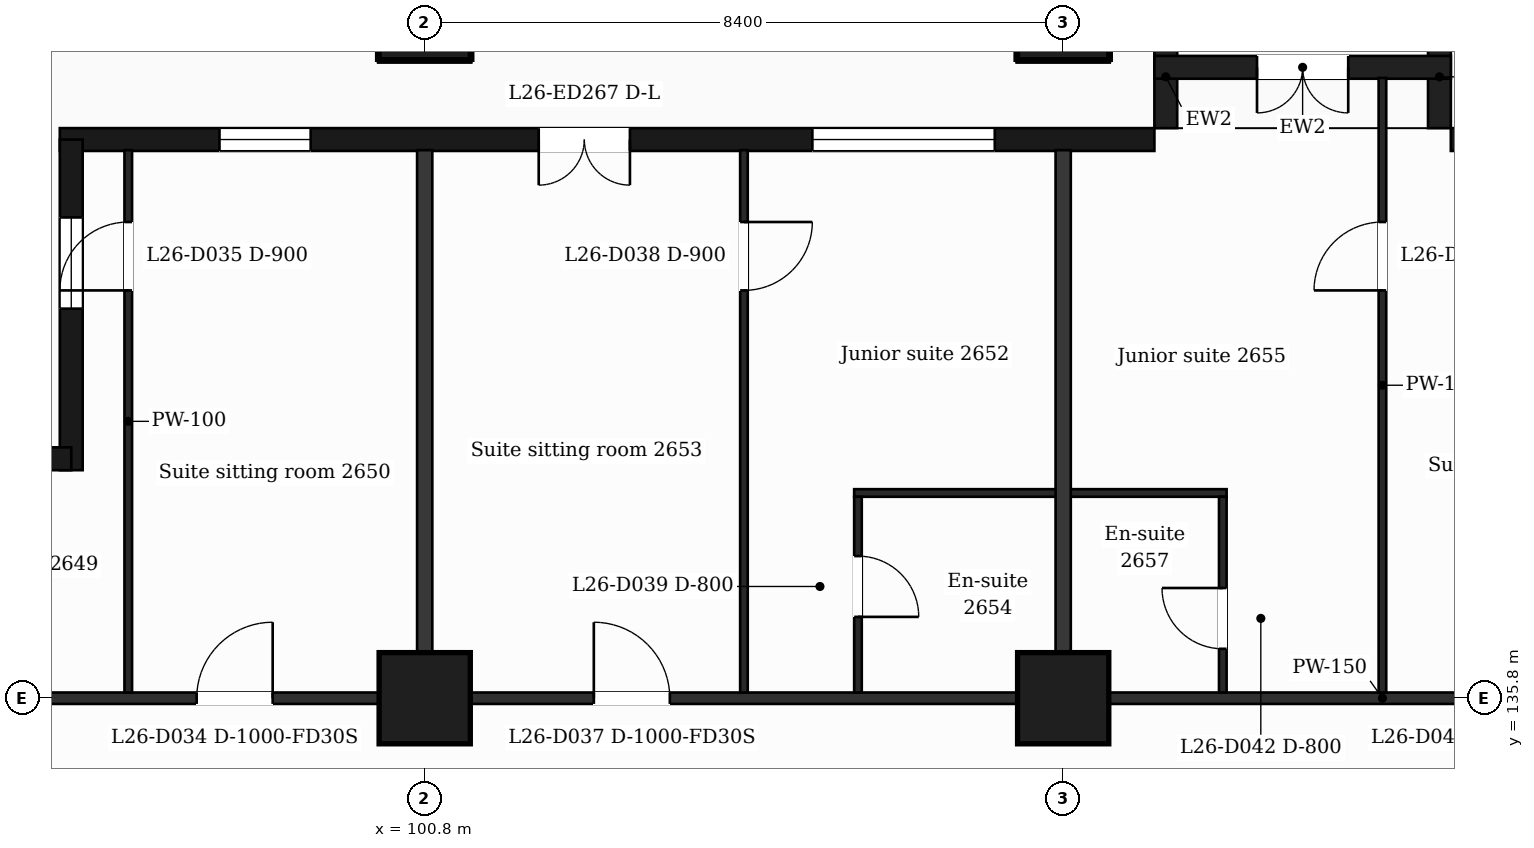
"""IFC4 building model, lengths in metres.
Left out: names, types, materials, properties, quantities, classifications, styles, units other than length and angle.
Written with IfcOpenShell. Run it as: python <this file> out.ifc"""

import sys

from ifc_helpers import new_model, si_unit, direction, frame, frame_2d, origin, origin_2d, place, context, subcontext, project, spatial, rectangle, extrude, element, fill, save


model = new_model("IFC4")
c1 = context("Model", 3, precision=1e-05, world=origin(), true_north=direction((0.0, 1.0)))
c2 = subcontext(c1, "Body", "Model", "MODEL_VIEW")
j1 = project(units=[si_unit("LENGTHUNIT", "METRE"), si_unit("PLANEANGLEUNIT", "RADIAN")], contexts=[c1])
p1 = place(None, origin())
s1 = spatial("IfcSite", under=j1, at=p1, CompositionType="ELEMENT")
p2 = place(p1, origin())
s2 = spatial("IfcBuilding", under=s1, at=p2, CompositionType="ELEMENT")
p3 = place(p2, frame((0.0, 0.0, 113.2)))
s3 = spatial("IfcBuildingStorey", under=s2, at=p3, CompositionType="ELEMENT", Elevation=113.2)
for number, where, z_axis, x_axis in (
    (1, (100.8, 135.8, 0.0), (0.0, 0.0, 1.0), (1.0, 0.0, 0.0)),
    (2, (109.2, 135.8, 0.0), (0.0, 0.0, 1.0), (1.0, 0.0, 0.0)),
    (3, (100.8, 144.8, 0.0), (0.0, 0.0, 1.0), (1.0, 0.0, 0.0)),
    (4, (109.2, 144.8, 0.0), (0.0, 0.0, 1.0), (1.0, 0.0, 0.0)),
):
    element("IfcColumn", number, at=place(p3, frame(where, z_axis=z_axis, x_axis=x_axis)), inside=s3, PredefinedType="COLUMN", context=c2, shape_type="SweptSolid", body=[
        extrude(rectangle(XDim=1.2, YDim=1.2, at=origin_2d()), origin(), (0.0, 0.0, 1.0), 3.7),
    ])
p4 = place(p3, frame((130.65, 143.15, 0.0), z_axis=(0.0, 0.0, 1.0), x_axis=(-1.0, 0.0, 0.0)))
e5 = element("IfcWall", 5, at=p4, inside=s3, PredefinedType="SOLIDWALL", context=c2, shape_type="SweptSolid", body=[
    extrude(rectangle(XDim=16.35, YDim=0.3, at=frame_2d((8.175, 0.0))), origin(), (0.0, 0.0, 1.0), 3.38),
])
p5 = place(p4, frame((1.95, 0.0, 0.9)))
e6 = element("IfcOpeningElement", 6, at=p5, cuts=e5, PredefinedType="OPENING", context=c2, shape_type="SweptSolid", body=[
    extrude(rectangle(XDim=1.2, YDim=2.1, at=frame_2d((0.6, 1.05))), frame((0.0, 0.16, 0.0), z_axis=(0.0, -1.0, 0.0), x_axis=(1.0, 0.0, 0.0)), (0.0, 0.0, 1.0), 0.32),
])
p6 = place(p4, frame((6.15, 0.0, 0.0)))
e7 = element("IfcOpeningElement", 7, at=p6, cuts=e5, PredefinedType="OPENING", context=c2, shape_type="SweptSolid", body=[
    extrude(rectangle(XDim=1.2, YDim=2.4, at=frame_2d((0.6, 1.2))), frame((0.0, 0.16, 0.0), z_axis=(0.0, -1.0, 0.0), x_axis=(1.0, 0.0, 0.0)), (0.0, 0.0, 1.0), 0.32),
])
p7 = place(p4, frame((9.75, 0.0, 0.9)))
e8 = element("IfcOpeningElement", 8, at=p7, cuts=e5, PredefinedType="OPENING", context=c2, shape_type="SweptSolid", body=[
    extrude(rectangle(XDim=2.4, YDim=2.1, at=frame_2d((1.2, 1.05))), frame((0.0, 0.16, 0.0), z_axis=(0.0, -1.0, 0.0), x_axis=(1.0, 0.0, 0.0)), (0.0, 0.0, 1.0), 0.32),
])
p8 = place(p4, frame((13.45, 0.0, 0.9)))
e9 = element("IfcOpeningElement", 9, at=p8, cuts=e5, PredefinedType="OPENING", context=c2, shape_type="SweptSolid", body=[
    extrude(rectangle(XDim=2.4, YDim=2.1, at=frame_2d((1.2, 1.05))), frame((0.0, 0.16, 0.0), z_axis=(0.0, -1.0, 0.0), x_axis=(1.0, 0.0, 0.0)), (0.0, 0.0, 1.0), 0.32),
])
p9 = place(p3, frame((110.4, 143.15, 0.0), z_axis=(0.0, 0.0, 1.0), x_axis=(-1.0, 0.0, 0.0)))
e10 = element("IfcWall", 10, at=p9, inside=s3, PredefinedType="SOLIDWALL", context=c2, shape_type="SweptSolid", body=[
    extrude(rectangle(XDim=14.4, YDim=0.3, at=frame_2d((7.2, 0.0))), origin(), (0.0, 0.0, 1.0), 3.38),
])
p10 = place(p9, frame((2.1, 0.0, 0.9)))
e11 = element("IfcOpeningElement", 11, at=p10, cuts=e10, PredefinedType="OPENING", context=c2, shape_type="SweptSolid", body=[
    extrude(rectangle(XDim=2.4, YDim=2.1, at=frame_2d((1.2, 1.05))), frame((0.0, 0.16, 0.0), z_axis=(0.0, -1.0, 0.0), x_axis=(1.0, 0.0, 0.0)), (0.0, 0.0, 1.0), 0.32),
])
p11 = place(p9, frame((6.9, 0.0, 0.0)))
e12 = element("IfcOpeningElement", 12, at=p11, cuts=e10, PredefinedType="OPENING", context=c2, shape_type="SweptSolid", body=[
    extrude(rectangle(XDim=1.2, YDim=2.4, at=frame_2d((0.6, 1.2))), frame((0.0, 0.16, 0.0), z_axis=(0.0, -1.0, 0.0), x_axis=(1.0, 0.0, 0.0)), (0.0, 0.0, 1.0), 0.32),
])
p12 = place(p9, frame((11.1, 0.0, 0.9)))
e13 = element("IfcOpeningElement", 13, at=p12, cuts=e10, PredefinedType="OPENING", context=c2, shape_type="SweptSolid", body=[
    extrude(rectangle(XDim=1.2, YDim=2.1, at=frame_2d((0.6, 1.05))), frame((0.0, 0.16, 0.0), z_axis=(0.0, -1.0, 0.0), x_axis=(1.0, 0.0, 0.0)), (0.0, 0.0, 1.0), 0.32),
])
for number, where, z_axis, x_axis in (
    (14, (114.15, 143.3, 0.0), (0.0, 0.0, 1.0), (0.0, 1.0, 0.0)),
    (15, (110.55, 143.3, 0.0), (0.0, 0.0, 1.0), (0.0, 1.0, 0.0)),
):
    element("IfcWall", number, at=place(p3, frame(where, z_axis=z_axis, x_axis=x_axis)), inside=s3, PredefinedType="SOLIDWALL", context=c2, shape_type="SweptSolid", body=[
        extrude(rectangle(XDim=1.35, YDim=0.3, at=frame_2d((0.675, 0.0))), origin(), (0.0, 0.0, 1.0), 3.38),
    ])
p13 = place(p3, frame((114.3, 144.1, 0.0), z_axis=(0.0, 0.0, 1.0), x_axis=(-1.0, 0.0, 0.0)))
e16 = element("IfcWall", 16, at=p13, inside=s3, PredefinedType="SOLIDWALL", context=c2, shape_type="SweptSolid", body=[
    extrude(rectangle(XDim=3.9, YDim=0.3, at=frame_2d((1.95, 0.0))), origin(), (0.0, 0.0, 1.0), 3.38),
])
p14 = place(p13, frame((1.35, 0.0, 0.0)))
e17 = element("IfcOpeningElement", 17, at=p14, cuts=e16, PredefinedType="OPENING", context=c2, shape_type="SweptSolid", body=[
    extrude(rectangle(XDim=1.2, YDim=2.4, at=frame_2d((0.6, 1.2))), frame((0.0, 0.16, 0.0), z_axis=(0.0, -1.0, 0.0), x_axis=(1.0, 0.0, 0.0)), (0.0, 0.0, 1.0), 0.32),
])
p15 = place(p3, frame((96.15, 143.15, 0.0), z_axis=(0.0, 0.0, 1.0), x_axis=(0.0, -1.0, 0.0)))
e18 = element("IfcWall", 18, at=p15, inside=s3, PredefinedType="SOLIDWALL", context=c2, shape_type="SweptSolid", body=[
    extrude(rectangle(XDim=4.35, YDim=0.3, at=frame_2d((2.175, 0.0))), origin(), (0.0, 0.0, 1.0), 3.38),
])
p16 = place(p15, frame((1.025, 0.0, 0.9)))
e19 = element("IfcOpeningElement", 19, at=p16, cuts=e18, PredefinedType="OPENING", context=c2, shape_type="SweptSolid", body=[
    extrude(rectangle(XDim=1.2, YDim=2.1, at=frame_2d((0.6, 1.05))), frame((0.0, 0.16, 0.0), z_axis=(0.0, -1.0, 0.0), x_axis=(1.0, 0.0, 0.0)), (0.0, 0.0, 1.0), 0.32),
])
p17 = place(p3, frame((96.15, 138.95, 0.0), z_axis=(0.0, 0.0, 1.0), x_axis=(-1.0, 0.0, 0.0)))
e20 = element("IfcWall", 20, at=p17, inside=s3, PredefinedType="SOLIDWALL", context=c2, shape_type="SweptSolid", body=[
    extrude(rectangle(XDim=5.104, YDim=0.3, at=frame_2d((2.552, 0.0))), origin(), (0.0, 0.0, 1.0), 3.38),
])
p18 = place(p17, frame((0.725, 0.0, 0.9)))
e21 = element("IfcOpeningElement", 21, at=p18, cuts=e20, PredefinedType="OPENING", context=c2, shape_type="SweptSolid", body=[
    extrude(rectangle(XDim=2.4, YDim=2.1, at=frame_2d((1.2, 1.05))), frame((0.0, 0.16, 0.0), z_axis=(0.0, -1.0, 0.0), x_axis=(1.0, 0.0, 0.0)), (0.0, 0.0, 1.0), 0.32),
])
p19 = place(p3, frame((90.895, 135.8, 0.0), z_axis=(0.0, 0.0, 1.0), x_axis=(1.0, 0.0, 0.0)))
e22 = element("IfcWall", 22, at=p19, inside=s3, PredefinedType="PARTITIONING", context=c2, shape_type="SweptSolid", body=[
    extrude(rectangle(XDim=45.011, YDim=0.15, at=frame_2d((22.505, 0.0))), origin(), (0.0, 0.0, 1.0), 3.38),
])
p20 = place(p19, frame((6.906, 0.0, 0.0)))
e23 = element("IfcOpeningElement", 23, at=p20, cuts=e22, PredefinedType="OPENING", context=c2, shape_type="SweptSolid", body=[
    extrude(rectangle(XDim=1.0, YDim=2.1, at=frame_2d((0.5, 1.05))), frame((0.0, 0.085, 0.0), z_axis=(0.0, -1.0, 0.0), x_axis=(1.0, 0.0, 0.0)), (0.0, 0.0, 1.0), 0.17),
])
p21 = place(p19, frame((12.13, 0.0, 0.0)))
e24 = element("IfcOpeningElement", 24, at=p21, cuts=e22, PredefinedType="OPENING", context=c2, shape_type="SweptSolid", body=[
    extrude(rectangle(XDim=1.0, YDim=2.1, at=frame_2d((0.5, 1.05))), frame((0.0, 0.085, 0.0), z_axis=(0.0, -1.0, 0.0), x_axis=(1.0, 0.0, 0.0)), (0.0, 0.0, 1.0), 0.17),
])
p22 = place(p19, frame((23.48, 0.0, 0.0)))
e25 = element("IfcOpeningElement", 25, at=p22, cuts=e22, PredefinedType="OPENING", context=c2, shape_type="SweptSolid", body=[
    extrude(rectangle(XDim=1.0, YDim=2.1, at=frame_2d((0.5, 1.05))), frame((0.0, 0.085, 0.0), z_axis=(0.0, -1.0, 0.0), x_axis=(1.0, 0.0, 0.0)), (0.0, 0.0, 1.0), 0.17),
])
p23 = place(p19, frame((27.515, 0.0, 0.0)))
e26 = element("IfcOpeningElement", 26, at=p23, cuts=e22, PredefinedType="OPENING", context=c2, shape_type="SweptSolid", body=[
    extrude(rectangle(XDim=0.95, YDim=2.1, at=frame_2d((0.475, 1.05))), frame((0.0, 0.085, 0.0), z_axis=(0.0, -1.0, 0.0), x_axis=(1.0, 0.0, 0.0)), (0.0, 0.0, 1.0), 0.17),
])
p24 = place(p19, frame((31.18, 0.0, 0.0)))
e27 = element("IfcOpeningElement", 27, at=p24, cuts=e22, PredefinedType="OPENING", context=c2, shape_type="SweptSolid", body=[
    extrude(rectangle(XDim=0.95, YDim=2.1, at=frame_2d((0.475, 1.05))), frame((0.0, 0.085, 0.0), z_axis=(0.0, -1.0, 0.0), x_axis=(1.0, 0.0, 0.0)), (0.0, 0.0, 1.0), 0.17),
])
p25 = place(p19, frame((39.814, 0.0, 0.0)))
e28 = element("IfcOpeningElement", 28, at=p25, cuts=e22, PredefinedType="OPENING", context=c2, shape_type="SweptSolid", body=[
    extrude(rectangle(XDim=0.95, YDim=2.1, at=frame_2d((0.475, 1.05))), frame((0.0, 0.085, 0.0), z_axis=(0.0, -1.0, 0.0), x_axis=(1.0, 0.0, 0.0)), (0.0, 0.0, 1.0), 0.17),
])
p26 = place(p3, frame((106.45, 138.5, 0.0), z_axis=(0.0, 0.0, 1.0), x_axis=(1.0, 0.0, 0.0)))
e29 = element("IfcWall", 29, at=p26, inside=s3, PredefinedType="PARTITIONING", context=c2, shape_type="SweptSolid", body=[
    extrude(rectangle(XDim=4.9, YDim=0.1, at=frame_2d((2.45, 0.0))), origin(), (0.0, 0.0, 1.0), 3.38),
])
p27 = place(p3, frame((96.9, 135.875, 0.0), z_axis=(0.0, 0.0, 1.0), x_axis=(0.0, 1.0, 0.0)))
e30 = element("IfcWall", 30, at=p27, inside=s3, PredefinedType="PARTITIONING", context=c2, shape_type="SweptSolid", body=[
    extrude(rectangle(XDim=7.135, YDim=0.1, at=frame_2d((3.567, 0.0))), origin(), (0.0, 0.0, 1.0), 3.38),
])
p28 = place(p27, frame((5.29, 0.0, 0.0)))
e31 = element("IfcOpeningElement", 31, at=p28, cuts=e30, PredefinedType="OPENING", context=c2, shape_type="SweptSolid", body=[
    extrude(rectangle(XDim=0.9, YDim=2.1, at=frame_2d((0.45, 1.05))), frame((0.0, 0.06, 0.0), z_axis=(0.0, -1.0, 0.0), x_axis=(1.0, 0.0, 0.0)), (0.0, 0.0, 1.0), 0.12),
])
p29 = place(p3, frame((100.8, 135.875, 0.0), z_axis=(0.0, 0.0, 1.0), x_axis=(0.0, 1.0, 0.0)))
e32 = element("IfcWall", 32, at=p29, inside=s3, PredefinedType="PARTITIONING", context=c2, shape_type="SweptSolid", body=[
    extrude(rectangle(XDim=7.135, YDim=0.2, at=frame_2d((3.567, 0.0))), origin(), (0.0, 0.0, 1.0), 3.38),
])
p30 = place(p3, frame((105.0, 135.875, 0.0), z_axis=(0.0, 0.0, 1.0), x_axis=(0.0, 1.0, 0.0)))
e33 = element("IfcWall", 33, at=p30, inside=s3, PredefinedType="PARTITIONING", context=c2, shape_type="SweptSolid", body=[
    extrude(rectangle(XDim=7.135, YDim=0.1, at=frame_2d((3.567, 0.0))), origin(), (0.0, 0.0, 1.0), 3.38),
])
p31 = place(p30, frame((5.29, 0.0, 0.0)))
e34 = element("IfcOpeningElement", 34, at=p31, cuts=e33, PredefinedType="OPENING", context=c2, shape_type="SweptSolid", body=[
    extrude(rectangle(XDim=0.9, YDim=2.1, at=frame_2d((0.45, 1.05))), frame((0.0, 0.06, 0.0), z_axis=(0.0, -1.0, 0.0), x_axis=(1.0, 0.0, 0.0)), (0.0, 0.0, 1.0), 0.12),
])
p32 = place(p3, frame((106.5, 135.875, 0.0), z_axis=(0.0, 0.0, 1.0), x_axis=(0.0, 1.0, 0.0)))
e35 = element("IfcWall", 35, at=p32, inside=s3, PredefinedType="PARTITIONING", context=c2, shape_type="SweptSolid", body=[
    extrude(rectangle(XDim=2.575, YDim=0.1, at=frame_2d((1.288, 0.0))), origin(), (0.0, 0.0, 1.0), 3.38),
])
p33 = place(p32, frame((0.995, 0.0, 0.0)))
e36 = element("IfcOpeningElement", 36, at=p33, cuts=e35, PredefinedType="OPENING", context=c2, shape_type="SweptSolid", body=[
    extrude(rectangle(XDim=0.8, YDim=2.1, at=frame_2d((0.4, 1.05))), frame((0.0, 0.06, 0.0), z_axis=(0.0, -1.0, 0.0), x_axis=(1.0, 0.0, 0.0)), (0.0, 0.0, 1.0), 0.12),
])
p34 = place(p3, frame((109.2, 135.875, 0.0), z_axis=(0.0, 0.0, 1.0), x_axis=(0.0, 1.0, 0.0)))
e37 = element("IfcWall", 37, at=p34, inside=s3, PredefinedType="PARTITIONING", context=c2, shape_type="SweptSolid", body=[
    extrude(rectangle(XDim=7.135, YDim=0.2, at=frame_2d((3.567, 0.0))), origin(), (0.0, 0.0, 1.0), 3.38),
])
p35 = place(p3, frame((111.3, 135.875, 0.0), z_axis=(0.0, 0.0, 1.0), x_axis=(0.0, 1.0, 0.0)))
e38 = element("IfcWall", 38, at=p35, inside=s3, PredefinedType="PARTITIONING", context=c2, shape_type="SweptSolid", body=[
    extrude(rectangle(XDim=2.575, YDim=0.1, at=frame_2d((1.288, 0.0))), origin(), (0.0, 0.0, 1.0), 3.38),
])
p36 = place(p35, frame((0.575, 0.0, 0.0)))
e39 = element("IfcOpeningElement", 39, at=p36, cuts=e38, PredefinedType="OPENING", context=c2, shape_type="SweptSolid", body=[
    extrude(rectangle(XDim=0.8, YDim=2.1, at=frame_2d((0.4, 1.05))), frame((0.0, 0.06, 0.0), z_axis=(0.0, -1.0, 0.0), x_axis=(1.0, 0.0, 0.0)), (0.0, 0.0, 1.0), 0.12),
])
p37 = place(p3, frame((113.4, 135.875, 0.0), z_axis=(0.0, 0.0, 1.0), x_axis=(0.0, 1.0, 0.0)))
e40 = element("IfcWall", 40, at=p37, inside=s3, PredefinedType="PARTITIONING", context=c2, shape_type="SweptSolid", body=[
    extrude(rectangle(XDim=8.085, YDim=0.1, at=frame_2d((4.042, 0.0))), origin(), (0.0, 0.0, 1.0), 3.38),
])
p38 = place(p37, frame((5.29, 0.0, 0.0)))
e41 = element("IfcOpeningElement", 41, at=p38, cuts=e40, PredefinedType="OPENING", context=c2, shape_type="SweptSolid", body=[
    extrude(rectangle(XDim=0.9, YDim=2.1, at=frame_2d((0.45, 1.05))), frame((0.0, 0.06, 0.0), z_axis=(0.0, -1.0, 0.0), x_axis=(1.0, 0.0, 0.0)), (0.0, 0.0, 1.0), 0.12),
])
p39 = place(p10, origin())
e42 = element("IfcWindow", 42, at=p39, inside=s3, PartitioningType="SINGLE_PANEL", PredefinedType="WINDOW", context=c2, shape_type="SweptSolid", body=[
    extrude(rectangle(XDim=2.4, YDim=2.1, at=frame_2d((1.2, 1.05))), frame((0.0, 0.03, 0.0), z_axis=(0.0, -1.0, 0.0), x_axis=(1.0, 0.0, 0.0)), (0.0, 0.0, 1.0), 0.06),
])
fill(e11, e42)
p40 = place(p11, origin())
e43 = element("IfcDoor", 43, at=p40, inside=s3, OperationType="DOUBLE_DOOR_SINGLE_SWING", PredefinedType="DOOR", context=c2, shape_type="SweptSolid", body=[
    extrude(rectangle(XDim=1.2, YDim=2.4, at=frame_2d((0.6, 1.2))), frame((0.0, 0.025, 0.0), z_axis=(0.0, -1.0, 0.0), x_axis=(1.0, 0.0, 0.0)), (0.0, 0.0, 1.0), 0.05),
])
fill(e12, e43)
p41 = place(p12, origin())
e44 = element("IfcWindow", 44, at=p41, inside=s3, PartitioningType="SINGLE_PANEL", PredefinedType="WINDOW", context=c2, shape_type="SweptSolid", body=[
    extrude(rectangle(XDim=1.2, YDim=2.1, at=frame_2d((0.6, 1.05))), frame((0.0, 0.03, 0.0), z_axis=(0.0, -1.0, 0.0), x_axis=(1.0, 0.0, 0.0)), (0.0, 0.0, 1.0), 0.06),
])
fill(e13, e44)
p42 = place(p14, origin())
e45 = element("IfcDoor", 45, at=p42, inside=s3, OperationType="DOUBLE_DOOR_SINGLE_SWING", PredefinedType="DOOR", context=c2, shape_type="SweptSolid", body=[
    extrude(rectangle(XDim=1.2, YDim=2.4, at=frame_2d((0.6, 1.2))), frame((0.0, 0.025, 0.0), z_axis=(0.0, -1.0, 0.0), x_axis=(1.0, 0.0, 0.0)), (0.0, 0.0, 1.0), 0.05),
])
fill(e17, e45)
p43 = place(p16, origin())
e46 = element("IfcWindow", 46, at=p43, inside=s3, PartitioningType="SINGLE_PANEL", PredefinedType="WINDOW", context=c2, shape_type="SweptSolid", body=[
    extrude(rectangle(XDim=1.2, YDim=2.1, at=frame_2d((0.6, 1.05))), frame((0.0, 0.03, 0.0), z_axis=(0.0, -1.0, 0.0), x_axis=(1.0, 0.0, 0.0)), (0.0, 0.0, 1.0), 0.06),
])
fill(e19, e46)
p44 = place(p20, origin())
e47 = element("IfcDoor", 47, at=p44, inside=s3, OperationType="SINGLE_SWING_RIGHT", PredefinedType="DOOR", context=c2, shape_type="SweptSolid", body=[
    extrude(rectangle(XDim=1.0, YDim=2.1, at=frame_2d((0.5, 1.05))), frame((0.0, 0.025, 0.0), z_axis=(0.0, -1.0, 0.0), x_axis=(1.0, 0.0, 0.0)), (0.0, 0.0, 1.0), 0.05),
])
fill(e23, e47)
p45 = place(p28, origin())
e48 = element("IfcDoor", 48, at=p45, inside=s3, OperationType="SINGLE_SWING_LEFT", PredefinedType="DOOR", context=c2, shape_type="SweptSolid", body=[
    extrude(rectangle(XDim=0.9, YDim=2.1, at=frame_2d((0.45, 1.05))), frame((0.0, 0.025, 0.0), z_axis=(0.0, -1.0, 0.0), x_axis=(1.0, 0.0, 0.0)), (0.0, 0.0, 1.0), 0.05),
])
fill(e31, e48)
p46 = place(p21, origin())
e49 = element("IfcDoor", 49, at=p46, inside=s3, OperationType="SINGLE_SWING_LEFT", PredefinedType="DOOR", context=c2, shape_type="SweptSolid", body=[
    extrude(rectangle(XDim=1.0, YDim=2.1, at=frame_2d((0.5, 1.05))), frame((0.0, 0.025, 0.0), z_axis=(0.0, -1.0, 0.0), x_axis=(1.0, 0.0, 0.0)), (0.0, 0.0, 1.0), 0.05),
])
fill(e24, e49)
p47 = place(p31, origin())
e50 = element("IfcDoor", 50, at=p47, inside=s3, OperationType="SINGLE_SWING_RIGHT", PredefinedType="DOOR", context=c2, shape_type="SweptSolid", body=[
    extrude(rectangle(XDim=0.9, YDim=2.1, at=frame_2d((0.45, 1.05))), frame((0.0, 0.025, 0.0), z_axis=(0.0, -1.0, 0.0), x_axis=(1.0, 0.0, 0.0)), (0.0, 0.0, 1.0), 0.05),
])
fill(e34, e50)
p48 = place(p33, origin())
e51 = element("IfcDoor", 51, at=p48, inside=s3, OperationType="SINGLE_SWING_LEFT", PredefinedType="DOOR", context=c2, shape_type="SweptSolid", body=[
    extrude(rectangle(XDim=0.8, YDim=2.1, at=frame_2d((0.4, 1.05))), frame((0.0, 0.025, 0.0), z_axis=(0.0, -1.0, 0.0), x_axis=(1.0, 0.0, 0.0)), (0.0, 0.0, 1.0), 0.05),
])
fill(e36, e51)
p49 = place(p38, origin())
e52 = element("IfcDoor", 52, at=p49, inside=s3, OperationType="SINGLE_SWING_LEFT", PredefinedType="DOOR", context=c2, shape_type="SweptSolid", body=[
    extrude(rectangle(XDim=0.9, YDim=2.1, at=frame_2d((0.45, 1.05))), frame((0.0, 0.025, 0.0), z_axis=(0.0, -1.0, 0.0), x_axis=(1.0, 0.0, 0.0)), (0.0, 0.0, 1.0), 0.05),
])
fill(e41, e52)
p50 = place(p36, origin())
e53 = element("IfcDoor", 53, at=p50, inside=s3, OperationType="SINGLE_SWING_RIGHT", PredefinedType="DOOR", context=c2, shape_type="SweptSolid", body=[
    extrude(rectangle(XDim=0.8, YDim=2.1, at=frame_2d((0.4, 1.05))), frame((0.0, 0.025, 0.0), z_axis=(0.0, -1.0, 0.0), x_axis=(1.0, 0.0, 0.0)), (0.0, 0.0, 1.0), 0.05),
])
fill(e39, e53)
save(model, sys.argv[1])
